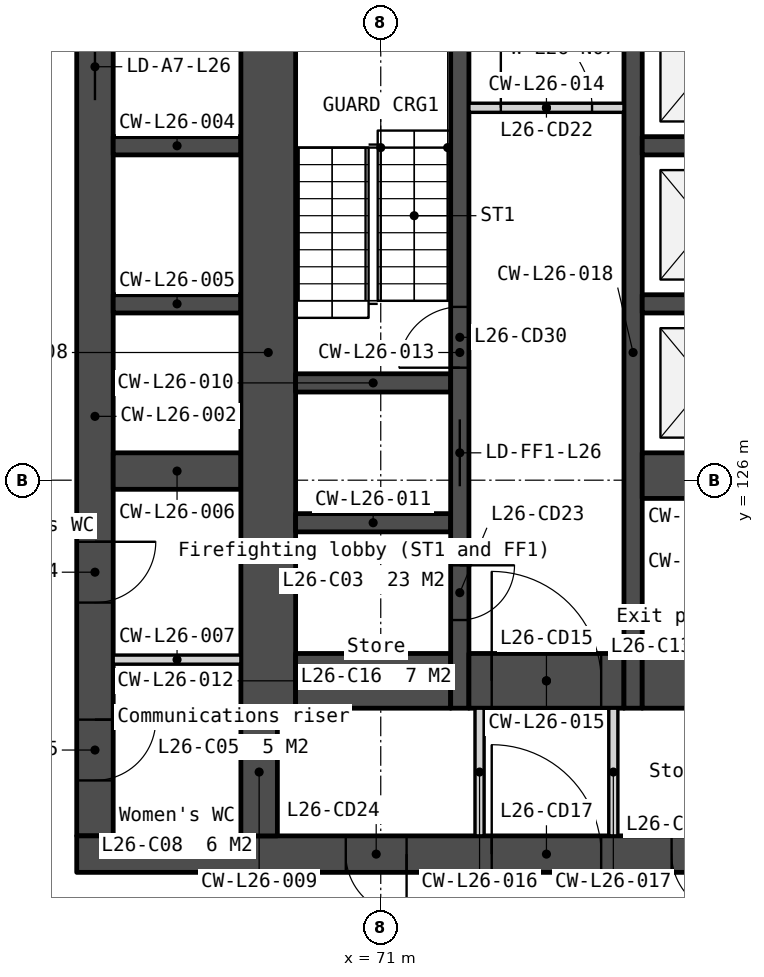
"""IFC4 building model, lengths in metres.
Left out: names, types, materials, properties, quantities, classifications, styles, units other than length and angle.
Written with IfcOpenShell. Run it as: python <this file> out.ifc"""

import sys

from ifc_helpers import new_model, si_unit, direction, frame, frame_2d, origin, place, context, subcontext, project, spatial, polyline, rectangle, outline, extrude, element, fill, save


model = new_model("IFC4")
c1 = context("Model", 3, precision=1e-05, world=origin(), true_north=direction((0.0, 1.0)))
c2 = subcontext(c1, "Body", "Model", "MODEL_VIEW")
j1 = project(units=[si_unit("LENGTHUNIT", "METRE"), si_unit("PLANEANGLEUNIT", "RADIAN")], contexts=[c1])
p1 = place(None, origin())
s1 = spatial("IfcSite", under=j1, at=p1, CompositionType="ELEMENT")
p2 = place(p1, origin())
s2 = spatial("IfcBuilding", under=s1, at=p2, CompositionType="ELEMENT")
p3 = place(p2, frame((0.0, 0.0, 106.3)))
s3 = spatial("IfcBuildingStorey", under=s2, at=p3, CompositionType="ELEMENT", Elevation=106.3)
p4 = place(p3, frame((66.3, 133.95, 0.0), z_axis=(0.0, 0.0, 1.0), x_axis=(0.0, -1.0, 0.0)))
e1 = element("IfcWall", 1, at=p4, inside=s3, PredefinedType="SOLIDWALL", context=c2, shape_type="SweptSolid", body=[
    extrude(rectangle(XDim=13.8, YDim=0.6, at=frame_2d((6.9, 0.0))), origin(), (0.0, 0.0, 1.0), 3.35),
])
p5 = place(p4, frame((0.6, 0.0, 0.0)))
e2 = element("IfcOpeningElement", 2, at=p5, cuts=e1, PredefinedType="OPENING", context=c2, shape_type="SweptSolid", body=[
    extrude(rectangle(XDim=1.1, YDim=2.1, at=frame_2d((0.55, 1.05))), frame((0.0, 0.31, 0.0), z_axis=(0.0, -1.0, 0.0), x_axis=(1.0, 0.0, 0.0)), (0.0, 0.0, 1.0), 0.62),
])
p6 = place(p4, frame((8.963, 0.0, 0.0)))
e3 = element("IfcOpeningElement", 3, at=p6, cuts=e1, PredefinedType="OPENING", context=c2, shape_type="SweptSolid", body=[
    extrude(rectangle(XDim=1.0, YDim=2.1, at=frame_2d((0.5, 1.05))), frame((0.0, 0.31, 0.0), z_axis=(0.0, -1.0, 0.0), x_axis=(1.0, 0.0, 0.0)), (0.0, 0.0, 1.0), 0.62),
])
p7 = place(p4, frame((11.888, 0.0, 0.0)))
e4 = element("IfcOpeningElement", 4, at=p7, cuts=e1, PredefinedType="OPENING", context=c2, shape_type="SweptSolid", body=[
    extrude(rectangle(XDim=1.0, YDim=2.1, at=frame_2d((0.5, 1.05))), frame((0.0, 0.31, 0.0), z_axis=(0.0, -1.0, 0.0), x_axis=(1.0, 0.0, 0.0)), (0.0, 0.0, 1.0), 0.62),
])
p8 = place(p3, frame((66.0, 119.85, 0.0), z_axis=(0.0, 0.0, 1.0), x_axis=(1.0, 0.0, 0.0)))
e5 = element("IfcWall", 5, at=p8, inside=s3, PredefinedType="SOLIDWALL", context=c2, shape_type="SweptSolid", body=[
    extrude(rectangle(XDim=28.0, YDim=0.6, at=frame_2d((14.0, 0.0))), origin(), (0.0, 0.0, 1.0), 3.35),
])
p9 = place(p8, frame((6.825, 0.0, 0.0)))
e6 = element("IfcOpeningElement", 6, at=p9, cuts=e5, PredefinedType="OPENING", context=c2, shape_type="SweptSolid", body=[
    extrude(rectangle(XDim=1.8, YDim=2.1, at=frame_2d((0.9, 1.05))), frame((0.0, 0.31, 0.0), z_axis=(0.0, -1.0, 0.0), x_axis=(1.0, 0.0, 0.0)), (0.0, 0.0, 1.0), 0.62),
])
p10 = place(p8, frame((15.85, 0.0, 0.0)))
e7 = element("IfcOpeningElement", 7, at=p10, cuts=e5, PredefinedType="OPENING", context=c2, shape_type="SweptSolid", body=[
    extrude(rectangle(XDim=1.5, YDim=2.1, at=frame_2d((0.75, 1.05))), frame((0.0, 0.31, 0.0), z_axis=(0.0, -1.0, 0.0), x_axis=(1.0, 0.0, 0.0)), (0.0, 0.0, 1.0), 0.62),
])
p11 = place(p8, frame((19.375, 0.0, 0.0)))
e8 = element("IfcOpeningElement", 8, at=p11, cuts=e5, PredefinedType="OPENING", context=c2, shape_type="SweptSolid", body=[
    extrude(rectangle(XDim=1.8, YDim=2.1, at=frame_2d((0.9, 1.05))), frame((0.0, 0.31, 0.0), z_axis=(0.0, -1.0, 0.0), x_axis=(1.0, 0.0, 0.0)), (0.0, 0.0, 1.0), 0.62),
])
p12 = place(p8, frame((4.425, 0.0, 0.0)))
e9 = element("IfcOpeningElement", 9, at=p12, cuts=e5, PredefinedType="OPENING", context=c2, shape_type="SweptSolid", body=[
    extrude(rectangle(XDim=1.0, YDim=2.1, at=frame_2d((0.5, 1.05))), frame((0.0, 0.31, 0.0), z_axis=(0.0, -1.0, 0.0), x_axis=(1.0, 0.0, 0.0)), (0.0, 0.0, 1.0), 0.62),
])
p13 = place(p8, frame((9.783, 0.0, 0.0)))
e10 = element("IfcOpeningElement", 10, at=p13, cuts=e5, PredefinedType="OPENING", context=c2, shape_type="SweptSolid", body=[
    extrude(rectangle(XDim=1.0, YDim=2.1, at=frame_2d((0.5, 1.05))), frame((0.0, 0.31, 0.0), z_axis=(0.0, -1.0, 0.0), x_axis=(1.0, 0.0, 0.0)), (0.0, 0.0, 1.0), 0.62),
])
p14 = place(p8, frame((11.525, 0.0, 0.0)))
e11 = element("IfcOpeningElement", 11, at=p14, cuts=e5, PredefinedType="OPENING", context=c2, shape_type="SweptSolid", body=[
    extrude(rectangle(XDim=1.0, YDim=2.1, at=frame_2d((0.5, 1.05))), frame((0.0, 0.31, 0.0), z_axis=(0.0, -1.0, 0.0), x_axis=(1.0, 0.0, 0.0)), (0.0, 0.0, 1.0), 0.62),
])
p15 = place(p8, frame((13.658, 0.0, 0.0)))
e12 = element("IfcOpeningElement", 12, at=p15, cuts=e5, PredefinedType="OPENING", context=c2, shape_type="SweptSolid", body=[
    extrude(rectangle(XDim=1.0, YDim=2.1, at=frame_2d((0.5, 1.05))), frame((0.0, 0.31, 0.0), z_axis=(0.0, -1.0, 0.0), x_axis=(1.0, 0.0, 0.0)), (0.0, 0.0, 1.0), 0.62),
])
p16 = place(p8, frame((22.575, 0.0, 0.0)))
e13 = element("IfcOpeningElement", 13, at=p16, cuts=e5, PredefinedType="OPENING", context=c2, shape_type="SweptSolid", body=[
    extrude(rectangle(XDim=1.0, YDim=2.1, at=frame_2d((0.5, 1.05))), frame((0.0, 0.31, 0.0), z_axis=(0.0, -1.0, 0.0), x_axis=(1.0, 0.0, 0.0)), (0.0, 0.0, 1.0), 0.62),
])
for number, where, z_axis, x_axis in (
    (14, (66.6, 131.5, 0.0), (0.0, 0.0, 1.0), (1.0, 0.0, 0.0)),
    (15, (66.6, 128.9, 0.0), (0.0, 0.0, 1.0), (1.0, 0.0, 0.0)),
):
    element("IfcWall", number, at=place(p3, frame(where, z_axis=z_axis, x_axis=x_axis)), inside=s3, PredefinedType="SOLIDWALL", context=c2, shape_type="SweptSolid", body=[
        extrude(rectangle(XDim=2.1, YDim=0.3, at=frame_2d((1.05, 0.0))), origin(), (0.0, 0.0, 1.0), 3.35),
    ])
p17 = place(p3, frame((66.6, 126.15, 0.0), z_axis=(0.0, 0.0, 1.0), x_axis=(1.0, 0.0, 0.0)))
e16 = element("IfcWall", 16, at=p17, inside=s3, PredefinedType="SOLIDWALL", context=c2, shape_type="SweptSolid", body=[
    extrude(rectangle(XDim=2.1, YDim=0.6, at=frame_2d((1.05, 0.0))), origin(), (0.0, 0.0, 1.0), 3.35),
])
p18 = place(p3, frame((66.6, 123.049, 0.0), z_axis=(0.0, 0.0, 1.0), x_axis=(1.0, 0.0, 0.0)))
e17 = element("IfcWall", 17, at=p18, inside=s3, PredefinedType="PARTITIONING", context=c2, shape_type="SweptSolid", body=[
    extrude(rectangle(XDim=2.1, YDim=0.15, at=frame_2d((1.05, 0.0))), origin(), (0.0, 0.0, 1.0), 3.35),
])
p19 = place(p3, frame((69.15, 133.95, 0.0), z_axis=(0.0, 0.0, 1.0), x_axis=(0.0, -1.0, 0.0)))
e18 = element("IfcWall", 18, at=p19, inside=s3, PredefinedType="SOLIDWALL", context=c2, shape_type="SweptSolid", body=[
    extrude(rectangle(XDim=11.7, YDim=0.9, at=frame_2d((5.85, 0.0))), origin(), (0.0, 0.0, 1.0), 3.35),
])
p20 = place(p3, frame((69.0, 122.25, 0.0), z_axis=(0.0, 0.0, 1.0), x_axis=(0.0, -1.0, 0.0)))
e19 = element("IfcWall", 19, at=p20, inside=s3, PredefinedType="SOLIDWALL", context=c2, shape_type="SweptSolid", body=[
    extrude(rectangle(XDim=2.1, YDim=0.6, at=frame_2d((1.05, 0.0))), origin(), (0.0, 0.0, 1.0), 3.35),
])
for number, where, z_axis, x_axis in (
    (20, (69.6, 127.6, 0.0), (0.0, 0.0, 1.0), (1.0, 0.0, 0.0)),
    (21, (69.6, 125.3, 0.0), (0.0, 0.0, 1.0), (1.0, 0.0, 0.0)),
):
    element("IfcWall", number, at=place(p3, frame(where, z_axis=z_axis, x_axis=x_axis)), inside=s3, PredefinedType="SOLIDWALL", context=c2, shape_type="SweptSolid", body=[
        extrude(rectangle(XDim=2.55, YDim=0.3, at=frame_2d((1.275, 0.0))), origin(), (0.0, 0.0, 1.0), 3.35),
    ])
p21 = place(p3, frame((69.6, 122.7, 0.0), z_axis=(0.0, 0.0, 1.0), x_axis=(1.0, 0.0, 0.0)))
e22 = element("IfcWall", 22, at=p21, inside=s3, PredefinedType="SOLIDWALL", context=c2, shape_type="SweptSolid", body=[
    extrude(rectangle(XDim=2.55, YDim=0.9, at=frame_2d((1.275, 0.0))), origin(), (0.0, 0.0, 1.0), 3.35),
])
p22 = place(p3, frame((72.3, 133.95, 0.0), z_axis=(0.0, 0.0, 1.0), x_axis=(0.0, -1.0, 0.0)))
e23 = element("IfcWall", 23, at=p22, inside=s3, PredefinedType="SOLIDWALL", context=c2, shape_type="SweptSolid", body=[
    extrude(rectangle(XDim=11.7, YDim=0.3, at=frame_2d((5.85, 0.0))), origin(), (0.0, 0.0, 1.0), 3.35),
])
p23 = place(p22, frame((6.95, 0.0, 0.0)))
e24 = element("IfcOpeningElement", 24, at=p23, cuts=e23, PredefinedType="OPENING", context=c2, shape_type="SweptSolid", body=[
    extrude(rectangle(XDim=1.1, YDim=2.1, at=frame_2d((0.55, 1.05))), frame((0.0, 0.16, 0.0), z_axis=(0.0, -1.0, 0.0), x_axis=(1.0, 0.0, 0.0)), (0.0, 0.0, 1.0), 0.32),
])
p24 = place(p22, frame((9.35, 0.0, 0.0)))
e25 = element("IfcOpeningElement", 25, at=p24, cuts=e23, PredefinedType="OPENING", context=c2, shape_type="SweptSolid", body=[
    extrude(rectangle(XDim=0.9, YDim=2.1, at=frame_2d((0.45, 1.05))), frame((0.0, 0.16, 0.0), z_axis=(0.0, -1.0, 0.0), x_axis=(1.0, 0.0, 0.0)), (0.0, 0.0, 1.0), 0.32),
])
p25 = place(p22, frame((5.1, 0.0, 0.0)))
e26 = element("IfcOpeningElement", 26, at=p25, cuts=e23, PredefinedType="OPENING", context=c2, shape_type="SweptSolid", body=[
    extrude(rectangle(XDim=1.0, YDim=2.1, at=frame_2d((0.5, 1.05))), frame((0.0, 0.16, 0.0), z_axis=(0.0, -1.0, 0.0), x_axis=(1.0, 0.0, 0.0)), (0.0, 0.0, 1.0), 0.32),
])
p26 = place(p3, frame((72.45, 132.125, 0.0), z_axis=(0.0, 0.0, 1.0), x_axis=(1.0, 0.0, 0.0)))
e27 = element("IfcWall", 27, at=p26, inside=s3, PredefinedType="PARTITIONING", context=c2, shape_type="SweptSolid", body=[
    extrude(rectangle(XDim=2.55, YDim=0.15, at=frame_2d((1.275, 0.0))), origin(), (0.0, 0.0, 1.0), 3.35),
])
p27 = place(p26, frame((0.525, 0.0, 0.0)))
e28 = element("IfcOpeningElement", 28, at=p27, cuts=e27, PredefinedType="OPENING", context=c2, shape_type="SweptSolid", body=[
    extrude(rectangle(XDim=1.5, YDim=2.1, at=frame_2d((0.75, 1.05))), frame((0.0, 0.085, 0.0), z_axis=(0.0, -1.0, 0.0), x_axis=(1.0, 0.0, 0.0)), (0.0, 0.0, 1.0), 0.17),
])
p28 = place(p3, frame((72.45, 122.7, 0.0), z_axis=(0.0, 0.0, 1.0), x_axis=(1.0, 0.0, 0.0)))
e29 = element("IfcWall", 29, at=p28, inside=s3, PredefinedType="SOLIDWALL", context=c2, shape_type="SweptSolid", body=[
    extrude(rectangle(XDim=2.55, YDim=0.9, at=frame_2d((1.275, 0.0))), origin(), (0.0, 0.0, 1.0), 3.35),
])
p29 = place(p28, frame((0.375, 0.0, 0.0)))
e30 = element("IfcOpeningElement", 30, at=p29, cuts=e29, PredefinedType="OPENING", context=c2, shape_type="SweptSolid", body=[
    extrude(rectangle(XDim=1.8, YDim=2.1, at=frame_2d((0.9, 1.05))), frame((0.0, 0.46, 0.0), z_axis=(0.0, -1.0, 0.0), x_axis=(1.0, 0.0, 0.0)), (0.0, 0.0, 1.0), 0.92),
])
for number, where, z_axis, x_axis in (
    (31, (72.625, 122.25, 0.0), (0.0, 0.0, 1.0), (0.0, -1.0, 0.0)),
    (32, (74.825, 122.25, 0.0), (0.0, 0.0, 1.0), (0.0, -1.0, 0.0)),
):
    element("IfcWall", number, at=place(p3, frame(where, z_axis=z_axis, x_axis=x_axis)), inside=s3, PredefinedType="PARTITIONING", context=c2, shape_type="SweptSolid", body=[
        extrude(rectangle(XDim=2.1, YDim=0.15, at=frame_2d((1.05, 0.0))), origin(), (0.0, 0.0, 1.0), 3.35),
    ])
p30 = place(p3, frame((75.15, 133.95, 0.0), z_axis=(0.0, 0.0, 1.0), x_axis=(0.0, -1.0, 0.0)))
e33 = element("IfcWall", 33, at=p30, inside=s3, PredefinedType="SOLIDWALL", context=c2, shape_type="SweptSolid", body=[
    extrude(rectangle(XDim=11.7, YDim=0.3, at=frame_2d((5.85, 0.0))), origin(), (0.0, 0.0, 1.0), 3.35),
])
for number, where, z_axis, x_axis in (
    (34, (75.3, 131.5, 0.0), (0.0, 0.0, 1.0), (1.0, 0.0, 0.0)),
    (35, (75.3, 128.9, 0.0), (0.0, 0.0, 1.0), (1.0, 0.0, 0.0)),
):
    element("IfcWall", number, at=place(p3, frame(where, z_axis=z_axis, x_axis=x_axis)), inside=s3, PredefinedType="SOLIDWALL", context=c2, shape_type="SweptSolid", body=[
        extrude(rectangle(XDim=2.1, YDim=0.3, at=frame_2d((1.05, 0.0))), origin(), (0.0, 0.0, 1.0), 3.35),
    ])
p31 = place(p3, frame((75.3, 126.075, 0.0), z_axis=(0.0, 0.0, 1.0), x_axis=(1.0, 0.0, 0.0)))
e36 = element("IfcWall", 36, at=p31, inside=s3, PredefinedType="SOLIDWALL", context=c2, shape_type="SweptSolid", body=[
    extrude(rectangle(XDim=2.1, YDim=0.75, at=frame_2d((1.05, 0.0))), origin(), (0.0, 0.0, 1.0), 3.35),
])
p32 = place(p3, frame((75.3, 122.7, 0.0), z_axis=(0.0, 0.0, 1.0), x_axis=(1.0, 0.0, 0.0)))
e37 = element("IfcWall", 37, at=p32, inside=s3, PredefinedType="SOLIDWALL", context=c2, shape_type="SweptSolid", body=[
    extrude(rectangle(XDim=6.2, YDim=0.9, at=frame_2d((3.1, 0.0))), origin(), (0.0, 0.0, 1.0), 3.35),
])
p33 = place(p3, frame((56.073, 130.263, -0.15), z_axis=(0.0, 0.0, 1.0), x_axis=(0.500000478905, -0.866025127289, 0.0)))
e38 = element("IfcWall", 38, at=p33, inside=s3, PredefinedType="SOLIDWALL", context=c2, shape_type="SweptSolid", body=[
    extrude(outline(polyline([(42.643, 0.0), (42.643, 3.5), (0.0, 3.5), (0.0, 0.0), (42.643, 0.0)])), frame((0.0, 0.225, 0.0), z_axis=(0.0, -1.0, 0.0), x_axis=(1.0, 0.0, 0.0)), (0.0, 0.0, 1.0), 0.45),
])
p34 = place(p33, frame((2.814, 0.0, 1.05)))
e39 = element("IfcOpeningElement", 39, at=p34, cuts=e38, PredefinedType="OPENING", context=c2, shape_type="SweptSolid", body=[
    extrude(rectangle(XDim=1.2, YDim=1.5, at=frame_2d((0.6, 0.75))), frame((0.0, 0.235, 0.0), z_axis=(0.0, -1.0, 0.0), x_axis=(1.0, 0.0, 0.0)), (0.0, 0.0, 1.0), 0.47),
])
p35 = place(p33, frame((4.514, 0.0, 1.05)))
e40 = element("IfcOpeningElement", 40, at=p35, cuts=e38, PredefinedType="OPENING", context=c2, shape_type="SweptSolid", body=[
    extrude(rectangle(XDim=1.2, YDim=1.5, at=frame_2d((0.6, 0.75))), frame((0.0, 0.235, 0.0), z_axis=(0.0, -1.0, 0.0), x_axis=(1.0, 0.0, 0.0)), (0.0, 0.0, 1.0), 0.47),
])
p36 = place(p33, frame((11.343, 0.0, 1.05)))
e41 = element("IfcOpeningElement", 41, at=p36, cuts=e38, PredefinedType="OPENING", context=c2, shape_type="SweptSolid", body=[
    extrude(rectangle(XDim=1.2, YDim=1.5, at=frame_2d((0.6, 0.75))), frame((0.0, 0.235, 0.0), z_axis=(0.0, -1.0, 0.0), x_axis=(1.0, 0.0, 0.0)), (0.0, 0.0, 1.0), 0.47),
])
p37 = place(p33, frame((13.043, 0.0, 1.05)))
e42 = element("IfcOpeningElement", 42, at=p37, cuts=e38, PredefinedType="OPENING", context=c2, shape_type="SweptSolid", body=[
    extrude(rectangle(XDim=1.2, YDim=1.5, at=frame_2d((0.6, 0.75))), frame((0.0, 0.235, 0.0), z_axis=(0.0, -1.0, 0.0), x_axis=(1.0, 0.0, 0.0)), (0.0, 0.0, 1.0), 0.47),
])
p38 = place(p33, frame((19.872, 0.0, 1.05)))
e43 = element("IfcOpeningElement", 43, at=p38, cuts=e38, PredefinedType="OPENING", context=c2, shape_type="SweptSolid", body=[
    extrude(rectangle(XDim=1.2, YDim=1.5, at=frame_2d((0.6, 0.75))), frame((0.0, 0.235, 0.0), z_axis=(0.0, -1.0, 0.0), x_axis=(1.0, 0.0, 0.0)), (0.0, 0.0, 1.0), 0.47),
])
p39 = place(p33, frame((21.572, 0.0, 1.05)))
e44 = element("IfcOpeningElement", 44, at=p39, cuts=e38, PredefinedType="OPENING", context=c2, shape_type="SweptSolid", body=[
    extrude(rectangle(XDim=1.2, YDim=1.5, at=frame_2d((0.6, 0.75))), frame((0.0, 0.235, 0.0), z_axis=(0.0, -1.0, 0.0), x_axis=(1.0, 0.0, 0.0)), (0.0, 0.0, 1.0), 0.47),
])
p40 = place(p33, frame((28.4, 0.0, 1.05)))
e45 = element("IfcOpeningElement", 45, at=p40, cuts=e38, PredefinedType="OPENING", context=c2, shape_type="SweptSolid", body=[
    extrude(rectangle(XDim=1.2, YDim=1.5, at=frame_2d((0.6, 0.75))), frame((0.0, 0.235, 0.0), z_axis=(0.0, -1.0, 0.0), x_axis=(1.0, 0.0, 0.0)), (0.0, 0.0, 1.0), 0.47),
])
p41 = place(p33, frame((30.1, 0.0, 1.05)))
e46 = element("IfcOpeningElement", 46, at=p41, cuts=e38, PredefinedType="OPENING", context=c2, shape_type="SweptSolid", body=[
    extrude(rectangle(XDim=1.2, YDim=1.5, at=frame_2d((0.6, 0.75))), frame((0.0, 0.235, 0.0), z_axis=(0.0, -1.0, 0.0), x_axis=(1.0, 0.0, 0.0)), (0.0, 0.0, 1.0), 0.47),
])
p42 = place(p33, frame((36.929, 0.0, 1.05)))
e47 = element("IfcOpeningElement", 47, at=p42, cuts=e38, PredefinedType="OPENING", context=c2, shape_type="SweptSolid", body=[
    extrude(rectangle(XDim=1.2, YDim=1.5, at=frame_2d((0.6, 0.75))), frame((0.0, 0.235, 0.0), z_axis=(0.0, -1.0, 0.0), x_axis=(1.0, 0.0, 0.0)), (0.0, 0.0, 1.0), 0.47),
])
p43 = place(p33, frame((38.629, 0.0, 1.05)))
e48 = element("IfcOpeningElement", 48, at=p43, cuts=e38, PredefinedType="OPENING", context=c2, shape_type="SweptSolid", body=[
    extrude(rectangle(XDim=1.2, YDim=1.5, at=frame_2d((0.6, 0.75))), frame((0.0, 0.235, 0.0), z_axis=(0.0, -1.0, 0.0), x_axis=(1.0, 0.0, 0.0)), (0.0, 0.0, 1.0), 0.47),
])
p44 = place(p5, origin())
e49 = element("IfcDoor", 49, at=p44, inside=s3, OperationType="SLIDING_TO_LEFT", PredefinedType="DOOR", context=c2, shape_type="SweptSolid", body=[
    extrude(rectangle(XDim=1.1, YDim=2.1, at=frame_2d((0.55, 1.05))), frame((0.0, 0.025, 0.0), z_axis=(0.0, -1.0, 0.0), x_axis=(1.0, 0.0, 0.0)), (0.0, 0.0, 1.0), 0.05),
])
fill(e2, e49)
p45 = place(p23, origin())
e50 = element("IfcDoor", 50, at=p45, inside=s3, OperationType="SLIDING_TO_LEFT", PredefinedType="DOOR", context=c2, shape_type="SweptSolid", body=[
    extrude(rectangle(XDim=1.1, YDim=2.1, at=frame_2d((0.55, 1.05))), frame((0.0, 0.025, 0.0), z_axis=(0.0, -1.0, 0.0), x_axis=(1.0, 0.0, 0.0)), (0.0, 0.0, 1.0), 0.05),
])
fill(e24, e50)
p46 = place(p29, origin())
e51 = element("IfcDoor", 51, at=p46, inside=s3, OperationType="DOUBLE_DOOR_DOUBLE_SWING", PredefinedType="DOOR", context=c2, shape_type="SweptSolid", body=[
    extrude(rectangle(XDim=1.8, YDim=2.1, at=frame_2d((0.9, 1.05))), frame((0.0, 0.025, 0.0), z_axis=(0.0, -1.0, 0.0), x_axis=(1.0, 0.0, 0.0)), (0.0, 0.0, 1.0), 0.05),
])
fill(e30, e51)
p47 = place(p9, origin())
e52 = element("IfcDoor", 52, at=p47, inside=s3, OperationType="DOUBLE_DOOR_DOUBLE_SWING", PredefinedType="DOOR", context=c2, shape_type="SweptSolid", body=[
    extrude(rectangle(XDim=1.8, YDim=2.1, at=frame_2d((0.9, 1.05))), frame((0.0, 0.025, 0.0), z_axis=(0.0, -1.0, 0.0), x_axis=(1.0, 0.0, 0.0)), (0.0, 0.0, 1.0), 0.05),
])
fill(e6, e52)
p48 = place(p27, origin())
e53 = element("IfcDoor", 53, at=p48, inside=s3, OperationType="DOUBLE_DOOR_DOUBLE_SWING", PredefinedType="DOOR", context=c2, shape_type="SweptSolid", body=[
    extrude(rectangle(XDim=1.5, YDim=2.1, at=frame_2d((0.75, 1.05))), frame((0.0, 0.025, 0.0), z_axis=(0.0, -1.0, 0.0), x_axis=(1.0, 0.0, 0.0)), (0.0, 0.0, 1.0), 0.05),
])
fill(e28, e53)
p49 = place(p24, origin())
e54 = element("IfcDoor", 54, at=p49, inside=s3, OperationType="SINGLE_SWING_LEFT", PredefinedType="DOOR", context=c2, shape_type="SweptSolid", body=[
    extrude(rectangle(XDim=0.9, YDim=2.1, at=frame_2d((0.45, 1.05))), frame((0.0, 0.025, 0.0), z_axis=(0.0, -1.0, 0.0), x_axis=(1.0, 0.0, 0.0)), (0.0, 0.0, 1.0), 0.05),
])
fill(e25, e54)
p50 = place(p12, origin())
e55 = element("IfcDoor", 55, at=p50, inside=s3, OperationType="SINGLE_SWING_RIGHT", PredefinedType="DOOR", context=c2, shape_type="SweptSolid", body=[
    extrude(rectangle(XDim=1.0, YDim=2.1, at=frame_2d((0.5, 1.05))), frame((0.0, 0.025, 0.0), z_axis=(0.0, -1.0, 0.0), x_axis=(1.0, 0.0, 0.0)), (0.0, 0.0, 1.0), 0.05),
])
fill(e9, e55)
p51 = place(p13, origin())
e56 = element("IfcDoor", 56, at=p51, inside=s3, OperationType="SINGLE_SWING_RIGHT", PredefinedType="DOOR", context=c2, shape_type="SweptSolid", body=[
    extrude(rectangle(XDim=1.0, YDim=2.1, at=frame_2d((0.5, 1.05))), frame((0.0, 0.025, 0.0), z_axis=(0.0, -1.0, 0.0), x_axis=(1.0, 0.0, 0.0)), (0.0, 0.0, 1.0), 0.05),
])
fill(e10, e56)
p52 = place(p25, origin())
e57 = element("IfcDoor", 57, at=p52, inside=s3, OperationType="SINGLE_SWING_RIGHT", PredefinedType="DOOR", context=c2, shape_type="SweptSolid", body=[
    extrude(rectangle(XDim=1.0, YDim=2.1, at=frame_2d((0.5, 1.05))), frame((0.0, 0.025, 0.0), z_axis=(0.0, -1.0, 0.0), x_axis=(1.0, 0.0, 0.0)), (0.0, 0.0, 1.0), 0.05),
])
fill(e26, e57)
p53 = place(p6, origin())
e58 = element("IfcDoor", 58, at=p53, inside=s3, OperationType="SINGLE_SWING_LEFT", PredefinedType="DOOR", context=c2, shape_type="SweptSolid", body=[
    extrude(rectangle(XDim=1.0, YDim=2.1, at=frame_2d((0.5, 1.05))), frame((0.0, 0.025, 0.0), z_axis=(0.0, -1.0, 0.0), x_axis=(1.0, 0.0, 0.0)), (0.0, 0.0, 1.0), 0.05),
])
fill(e3, e58)
p54 = place(p7, origin())
e59 = element("IfcDoor", 59, at=p54, inside=s3, OperationType="SINGLE_SWING_LEFT", PredefinedType="DOOR", context=c2, shape_type="SweptSolid", body=[
    extrude(rectangle(XDim=1.0, YDim=2.1, at=frame_2d((0.5, 1.05))), frame((0.0, 0.025, 0.0), z_axis=(0.0, -1.0, 0.0), x_axis=(1.0, 0.0, 0.0)), (0.0, 0.0, 1.0), 0.05),
])
fill(e4, e59)
save(model, sys.argv[1])
